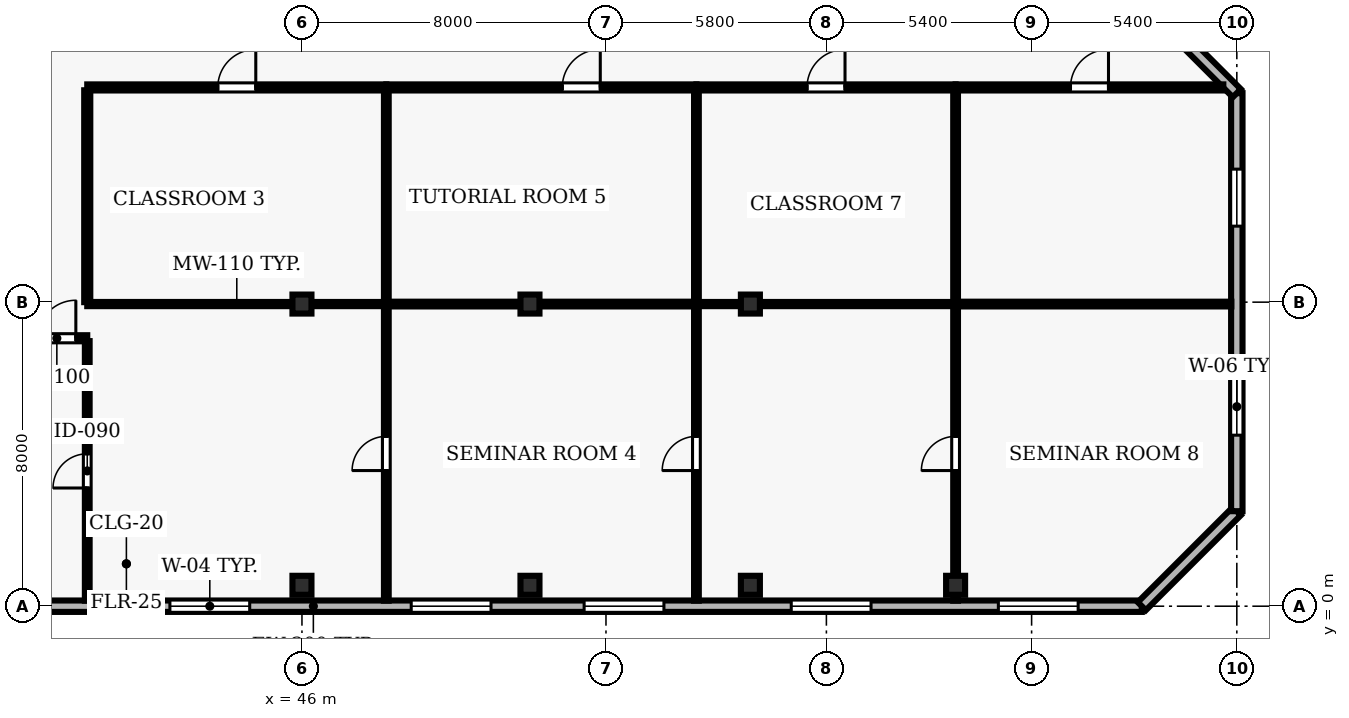
"""IFC4 building model, lengths in metres.
Left out: names, types, materials, properties, quantities, classifications, styles, units other than length and angle.
Written with IfcOpenShell. Run it as: python <this file> out.ifc"""

import sys

from ifc_helpers import new_model, si_unit, direction, frame, frame_2d, origin, origin_2d, place, context, subcontext, project, spatial, rectangle, hollow_rectangle, extrude, element, fill, save


model = new_model("IFC4")
c1 = context("Model", 3, precision=1e-05, world=origin(), true_north=direction((0.0, 1.0)))
c2 = subcontext(c1, "Body", "Model", "MODEL_VIEW")
j1 = project(units=[si_unit("LENGTHUNIT", "METRE"), si_unit("PLANEANGLEUNIT", "RADIAN")], contexts=[c1])
p1 = place(None, origin())
s1 = spatial("IfcSite", under=j1, at=p1, CompositionType="ELEMENT")
p2 = place(p1, origin())
s2 = spatial("IfcBuilding", under=s1, at=p2, CompositionType="ELEMENT")
p3 = place(p2, frame((0.0, 0.0, 161.9)))
s3 = spatial("IfcBuildingStorey", under=s2, at=p3, CompositionType="ELEMENT", Elevation=161.9)
for number, where, z_axis, x_axis in (
    (1, (46.0, 0.55, 0.0), (0.0, 0.0, 1.0), (1.0, 0.0, 0.0)),
    (2, (46.0, 7.95, 0.0), (0.0, 0.0, 1.0), (1.0, 0.0, 0.0)),
    (3, (52.0, 0.55, 0.0), (0.0, 0.0, 1.0), (1.0, 0.0, 0.0)),
    (4, (52.0, 7.95, 0.0), (0.0, 0.0, 1.0), (1.0, 0.0, 0.0)),
    (5, (57.8, 0.55, 0.0), (0.0, 0.0, 1.0), (1.0, 0.0, 0.0)),
    (6, (57.8, 7.95, 0.0), (0.0, 0.0, 1.0), (1.0, 0.0, 0.0)),
    (7, (63.2, 0.55, 0.0), (0.0, 0.0, 1.0), (1.0, 0.0, 0.0)),
):
    element("IfcColumn", number, at=place(p3, frame(where, z_axis=z_axis, x_axis=x_axis)), inside=s3, PredefinedType="COLUMN", context=c2, shape_type="SweptSolid", body=[
        extrude(hollow_rectangle(XDim=0.5, YDim=0.5, WallThickness=0.025, at=origin_2d()), origin(), (0.0, 0.0, 1.0), 3.9),
    ])
p4 = place(p3, frame((24.5, 0.0, 0.0), z_axis=(0.0, 0.0, 1.0), x_axis=(1.0, 0.0, 0.0)))
e8 = element("IfcWall", 8, at=p4, inside=s3, PredefinedType="SOLIDWALL", context=c2, shape_type="SweptSolid", body=[
    extrude(rectangle(XDim=43.6, YDim=0.3, at=frame_2d((21.8, 0.0))), origin(), (0.0, 0.0, 1.0), 3.64),
])
p5 = place(p4, frame((1.675, 0.0, 0.9)))
e9 = element("IfcOpeningElement", 9, at=p5, cuts=e8, PredefinedType="OPENING", context=c2, shape_type="SweptSolid", body=[
    extrude(rectangle(XDim=2.1, YDim=1.6, at=frame_2d((1.05, 0.8))), frame((0.0, 0.16, 0.0), z_axis=(0.0, -1.0, 0.0), x_axis=(1.0, 0.0, 0.0)), (0.0, 0.0, 1.0), 0.32),
])
p6 = place(p4, frame((18.025, 0.0, 0.9)))
e10 = element("IfcOpeningElement", 10, at=p6, cuts=e8, PredefinedType="OPENING", context=c2, shape_type="SweptSolid", body=[
    extrude(rectangle(XDim=2.1, YDim=1.6, at=frame_2d((1.05, 0.8))), frame((0.0, 0.16, 0.0), z_axis=(0.0, -1.0, 0.0), x_axis=(1.0, 0.0, 0.0)), (0.0, 0.0, 1.0), 0.32),
])
p7 = place(p4, frame((24.375, 0.0, 0.9)))
e11 = element("IfcOpeningElement", 11, at=p7, cuts=e8, PredefinedType="OPENING", context=c2, shape_type="SweptSolid", body=[
    extrude(rectangle(XDim=2.1, YDim=1.6, at=frame_2d((1.05, 0.8))), frame((0.0, 0.16, 0.0), z_axis=(0.0, -1.0, 0.0), x_axis=(1.0, 0.0, 0.0)), (0.0, 0.0, 1.0), 0.32),
])
p8 = place(p4, frame((28.925, 0.0, 0.9)))
e12 = element("IfcOpeningElement", 12, at=p8, cuts=e8, PredefinedType="OPENING", context=c2, shape_type="SweptSolid", body=[
    extrude(rectangle(XDim=2.1, YDim=1.6, at=frame_2d((1.05, 0.8))), frame((0.0, 0.16, 0.0), z_axis=(0.0, -1.0, 0.0), x_axis=(1.0, 0.0, 0.0)), (0.0, 0.0, 1.0), 0.32),
])
p9 = place(p4, frame((34.375, 0.0, 0.9)))
e13 = element("IfcOpeningElement", 13, at=p9, cuts=e8, PredefinedType="OPENING", context=c2, shape_type="SweptSolid", body=[
    extrude(rectangle(XDim=2.1, YDim=1.6, at=frame_2d((1.05, 0.8))), frame((0.0, 0.16, 0.0), z_axis=(0.0, -1.0, 0.0), x_axis=(1.0, 0.0, 0.0)), (0.0, 0.0, 1.0), 0.32),
])
p10 = place(p4, frame((39.825, 0.0, 0.9)))
e14 = element("IfcOpeningElement", 14, at=p10, cuts=e8, PredefinedType="OPENING", context=c2, shape_type="SweptSolid", body=[
    extrude(rectangle(XDim=2.1, YDim=1.6, at=frame_2d((1.05, 0.8))), frame((0.0, 0.16, 0.0), z_axis=(0.0, -1.0, 0.0), x_axis=(1.0, 0.0, 0.0)), (0.0, 0.0, 1.0), 0.32),
])
p11 = place(p3, frame((68.1, 0.0, 0.0), z_axis=(0.0, 0.0, 1.0), x_axis=(0.707106781187, 0.707106781187, 0.0)))
e15 = element("IfcWall", 15, at=p11, inside=s3, PredefinedType="SOLIDWALL", context=c2, shape_type="SweptSolid", body=[
    extrude(rectangle(XDim=3.536, YDim=0.3, at=frame_2d((1.768, 0.0))), origin(), (0.0, 0.0, 1.0), 3.64),
])
p12 = place(p3, frame((70.6, 2.5, 0.0), z_axis=(0.0, 0.0, 1.0), x_axis=(0.0, 1.0, 0.0)))
e16 = element("IfcWall", 16, at=p12, inside=s3, PredefinedType="SOLIDWALL", context=c2, shape_type="SweptSolid", body=[
    extrude(rectangle(XDim=11.0, YDim=0.3, at=frame_2d((5.5, 0.0))), origin(), (0.0, 0.0, 1.0), 3.64),
])
p13 = place(p12, frame((2.0, 0.0, 0.9)))
e17 = element("IfcOpeningElement", 17, at=p13, cuts=e16, PredefinedType="OPENING", context=c2, shape_type="SweptSolid", body=[
    extrude(rectangle(XDim=1.5, YDim=1.8, at=frame_2d((0.75, 0.9))), frame((0.0, 0.16, 0.0), z_axis=(0.0, -1.0, 0.0), x_axis=(1.0, 0.0, 0.0)), (0.0, 0.0, 1.0), 0.32),
])
p14 = place(p12, frame((7.5, 0.0, 0.9)))
e18 = element("IfcOpeningElement", 18, at=p14, cuts=e16, PredefinedType="OPENING", context=c2, shape_type="SweptSolid", body=[
    extrude(rectangle(XDim=1.5, YDim=1.8, at=frame_2d((0.75, 0.9))), frame((0.0, 0.16, 0.0), z_axis=(0.0, -1.0, 0.0), x_axis=(1.0, 0.0, 0.0)), (0.0, 0.0, 1.0), 0.32),
])
p15 = place(p3, frame((70.6, 13.5, 0.0), z_axis=(0.0, 0.0, 1.0), x_axis=(-0.707106781187, 0.707106781187, 0.0)))
e19 = element("IfcWall", 19, at=p15, inside=s3, PredefinedType="SOLIDWALL", context=c2, shape_type="SweptSolid", body=[
    extrude(rectangle(XDim=3.536, YDim=0.3, at=frame_2d((1.768, 0.0))), origin(), (0.0, 0.0, 1.0), 3.64),
])
p16 = place(p3, frame((38.05, 7.05, 0.0), z_axis=(0.0, 0.0, 1.0), x_axis=(1.0, 0.0, 0.0)))
e20 = element("IfcWall", 20, at=p16, inside=s3, PredefinedType="PARTITIONING", context=c2, shape_type="SweptSolid", body=[
    extrude(rectangle(XDim=2.3, YDim=0.16, at=frame_2d((1.15, 0.0))), origin(), (0.0, 0.0, 1.0), 3.64),
])
p17 = place(p16, frame((1.0, 0.0, 0.0)))
e21 = element("IfcOpeningElement", 21, at=p17, cuts=e20, PredefinedType="OPENING", context=c2, shape_type="SweptSolid", body=[
    extrude(rectangle(XDim=1.0, YDim=2.1, at=frame_2d((0.5, 1.05))), frame((0.0, 0.09, 0.0), z_axis=(0.0, -1.0, 0.0), x_axis=(1.0, 0.0, 0.0)), (0.0, 0.0, 1.0), 0.18),
])
p18 = place(p3, frame((40.35, 13.65, 0.0), z_axis=(0.0, 0.0, 1.0), x_axis=(1.0, 0.0, 0.0)))
e22 = element("IfcWall", 22, at=p18, inside=s3, PredefinedType="PARTITIONING", context=c2, shape_type="SweptSolid", body=[
    extrude(rectangle(XDim=7.87, YDim=0.16, at=frame_2d((3.935, 0.0))), origin(), (0.0, 0.0, 1.0), 3.64),
])
p19 = place(p18, frame((3.435, 0.0, 0.0)))
e23 = element("IfcOpeningElement", 23, at=p19, cuts=e22, PredefinedType="OPENING", context=c2, shape_type="SweptSolid", body=[
    extrude(rectangle(XDim=1.0, YDim=2.1, at=frame_2d((0.5, 1.05))), frame((0.0, 0.09, 0.0), z_axis=(0.0, -1.0, 0.0), x_axis=(1.0, 0.0, 0.0)), (0.0, 0.0, 1.0), 0.18),
])
p20 = place(p3, frame((48.22, 7.95, 0.0), z_axis=(0.0, 0.0, 1.0), x_axis=(-1.0, 0.0, 0.0)))
e24 = element("IfcWall", 24, at=p20, inside=s3, PredefinedType="MOVABLE", context=c2, shape_type="SweptSolid", body=[
    extrude(rectangle(XDim=7.87, YDim=0.11, at=frame_2d((3.935, 0.0))), origin(), (0.0, 0.0, 1.0), 3.023),
])
p21 = place(p3, frame((48.22, 13.65, 0.0), z_axis=(0.0, 0.0, 1.0), x_axis=(1.0, 0.0, 0.0)))
e25 = element("IfcWall", 25, at=p21, inside=s3, PredefinedType="PARTITIONING", context=c2, shape_type="SweptSolid", body=[
    extrude(rectangle(XDim=8.16, YDim=0.16, at=frame_2d((4.08, 0.0))), origin(), (0.0, 0.0, 1.0), 3.64),
])
p22 = place(p21, frame((4.63, 0.0, 0.0)))
e26 = element("IfcOpeningElement", 26, at=p22, cuts=e25, PredefinedType="OPENING", context=c2, shape_type="SweptSolid", body=[
    extrude(rectangle(XDim=1.0, YDim=2.1, at=frame_2d((0.5, 1.05))), frame((0.0, 0.09, 0.0), z_axis=(0.0, -1.0, 0.0), x_axis=(1.0, 0.0, 0.0)), (0.0, 0.0, 1.0), 0.18),
])
p23 = place(p3, frame((56.38, 7.95, 0.0), z_axis=(0.0, 0.0, 1.0), x_axis=(-1.0, 0.0, 0.0)))
e27 = element("IfcWall", 27, at=p23, inside=s3, PredefinedType="PARTITIONING", context=c2, shape_type="SweptSolid", body=[
    extrude(rectangle(XDim=8.16, YDim=0.125, at=frame_2d((4.08, 0.0))), origin(), (0.0, 0.0, 1.0), 3.023),
])
p24 = place(p3, frame((56.38, 13.65, 0.0), z_axis=(0.0, 0.0, 1.0), x_axis=(1.0, 0.0, 0.0)))
e28 = element("IfcWall", 28, at=p24, inside=s3, PredefinedType="PARTITIONING", context=c2, shape_type="SweptSolid", body=[
    extrude(rectangle(XDim=6.82, YDim=0.16, at=frame_2d((3.41, 0.0))), origin(), (0.0, 0.0, 1.0), 3.64),
])
p25 = place(p24, frame((2.91, 0.0, 0.0)))
e29 = element("IfcOpeningElement", 29, at=p25, cuts=e28, PredefinedType="OPENING", context=c2, shape_type="SweptSolid", body=[
    extrude(rectangle(XDim=1.0, YDim=2.1, at=frame_2d((0.5, 1.05))), frame((0.0, 0.09, 0.0), z_axis=(0.0, -1.0, 0.0), x_axis=(1.0, 0.0, 0.0)), (0.0, 0.0, 1.0), 0.18),
])
p26 = place(p3, frame((63.2, 7.95, 0.0), z_axis=(0.0, 0.0, 1.0), x_axis=(-1.0, 0.0, 0.0)))
e30 = element("IfcWall", 30, at=p26, inside=s3, PredefinedType="MOVABLE", context=c2, shape_type="SweptSolid", body=[
    extrude(rectangle(XDim=6.82, YDim=0.11, at=frame_2d((3.41, 0.0))), origin(), (0.0, 0.0, 1.0), 3.023),
])
p27 = place(p3, frame((63.2, 13.65, 0.0), z_axis=(0.0, 0.0, 1.0), x_axis=(1.0, 0.0, 0.0)))
e31 = element("IfcWall", 31, at=p27, inside=s3, PredefinedType="PARTITIONING", context=c2, shape_type="SweptSolid", body=[
    extrude(rectangle(XDim=7.045, YDim=0.16, at=frame_2d((3.522, 0.0))), origin(), (0.0, 0.0, 1.0), 3.64),
])
p28 = place(p27, frame((3.023, 0.0, 0.0)))
e32 = element("IfcOpeningElement", 32, at=p28, cuts=e31, PredefinedType="OPENING", context=c2, shape_type="SweptSolid", body=[
    extrude(rectangle(XDim=1.0, YDim=2.1, at=frame_2d((0.5, 1.05))), frame((0.0, 0.09, 0.0), z_axis=(0.0, -1.0, 0.0), x_axis=(1.0, 0.0, 0.0)), (0.0, 0.0, 1.0), 0.18),
])
p29 = place(p3, frame((70.455, 7.95, 0.0), z_axis=(0.0, 0.0, 1.0), x_axis=(-1.0, 0.0, 0.0)))
e33 = element("IfcWall", 33, at=p29, inside=s3, PredefinedType="PARTITIONING", context=c2, shape_type="SweptSolid", body=[
    extrude(rectangle(XDim=7.255, YDim=0.125, at=frame_2d((3.627, 0.0))), origin(), (0.0, 0.0, 1.0), 3.64),
])
p30 = place(p3, frame((40.35, 0.145, 0.0), z_axis=(0.0, 0.0, 1.0), x_axis=(0.0, 1.0, 0.0)))
e34 = element("IfcWall", 34, at=p30, inside=s3, PredefinedType="PARTITIONING", context=c2, shape_type="SweptSolid", body=[
    extrude(rectangle(XDim=6.83, YDim=0.125, at=frame_2d((3.415, 0.0))), origin(), (0.0, 0.0, 1.0), 3.64),
])
p31 = place(p30, frame((2.965, 0.0, 0.0)))
e35 = element("IfcOpeningElement", 35, at=p31, cuts=e34, PredefinedType="OPENING", context=c2, shape_type="SweptSolid", body=[
    extrude(rectangle(XDim=0.9, YDim=2.1, at=frame_2d((0.45, 1.05))), frame((0.0, 0.073, 0.0), z_axis=(0.0, -1.0, 0.0), x_axis=(1.0, 0.0, 0.0)), (0.0, 0.0, 1.0), 0.145),
])
p32 = place(p3, frame((40.35, 8.0, 0.0), z_axis=(0.0, 0.0, 1.0), x_axis=(0.0, 1.0, 0.0)))
e36 = element("IfcWall", 36, at=p32, inside=s3, PredefinedType="PARTITIONING", context=c2, shape_type="SweptSolid", body=[
    extrude(rectangle(XDim=5.575, YDim=0.16, at=frame_2d((2.788, 0.0))), origin(), (0.0, 0.0, 1.0), 3.64),
])
p33 = place(p3, frame((48.22, 0.145, 0.0), z_axis=(0.0, 0.0, 1.0), x_axis=(0.0, 1.0, 0.0)))
e37 = element("IfcWall", 37, at=p33, inside=s3, PredefinedType="PARTITIONING", context=c2, shape_type="SweptSolid", body=[
    extrude(rectangle(XDim=7.748, YDim=0.125, at=frame_2d((3.874, 0.0))), origin(), (0.0, 0.0, 1.0), 3.64),
])
p34 = place(p33, frame((3.424, 0.0, 0.0)))
e38 = element("IfcOpeningElement", 38, at=p34, cuts=e37, PredefinedType="OPENING", context=c2, shape_type="SweptSolid", body=[
    extrude(rectangle(XDim=0.9, YDim=2.1, at=frame_2d((0.45, 1.05))), frame((0.0, 0.073, 0.0), z_axis=(0.0, -1.0, 0.0), x_axis=(1.0, 0.0, 0.0)), (0.0, 0.0, 1.0), 0.145),
])
p35 = place(p3, frame((48.22, 8.008, 0.0), z_axis=(0.0, 0.0, 1.0), x_axis=(0.0, 1.0, 0.0)))
e39 = element("IfcWall", 39, at=p35, inside=s3, PredefinedType="PARTITIONING", context=c2, shape_type="SweptSolid", body=[
    extrude(rectangle(XDim=5.567, YDim=0.125, at=frame_2d((2.783, 0.0))), origin(), (0.0, 0.0, 1.0), 3.64),
])
p36 = place(p3, frame((56.38, 0.145, 0.0), z_axis=(0.0, 0.0, 1.0), x_axis=(0.0, 1.0, 0.0)))
e40 = element("IfcWall", 40, at=p36, inside=s3, PredefinedType="PARTITIONING", context=c2, shape_type="SweptSolid", body=[
    extrude(rectangle(XDim=7.748, YDim=0.125, at=frame_2d((3.874, 0.0))), origin(), (0.0, 0.0, 1.0), 3.64),
])
p37 = place(p36, frame((3.424, 0.0, 0.0)))
e41 = element("IfcOpeningElement", 41, at=p37, cuts=e40, PredefinedType="OPENING", context=c2, shape_type="SweptSolid", body=[
    extrude(rectangle(XDim=0.9, YDim=2.1, at=frame_2d((0.45, 1.05))), frame((0.0, 0.073, 0.0), z_axis=(0.0, -1.0, 0.0), x_axis=(1.0, 0.0, 0.0)), (0.0, 0.0, 1.0), 0.145),
])
p38 = place(p3, frame((56.38, 8.008, 0.0), z_axis=(0.0, 0.0, 1.0), x_axis=(0.0, 1.0, 0.0)))
e42 = element("IfcWall", 42, at=p38, inside=s3, PredefinedType="PARTITIONING", context=c2, shape_type="SweptSolid", body=[
    extrude(rectangle(XDim=5.567, YDim=0.125, at=frame_2d((2.783, 0.0))), origin(), (0.0, 0.0, 1.0), 3.64),
])
p39 = place(p3, frame((63.2, 0.145, 0.0), z_axis=(0.0, 0.0, 1.0), x_axis=(0.0, 1.0, 0.0)))
e43 = element("IfcWall", 43, at=p39, inside=s3, PredefinedType="PARTITIONING", context=c2, shape_type="SweptSolid", body=[
    extrude(rectangle(XDim=7.748, YDim=0.125, at=frame_2d((3.874, 0.0))), origin(), (0.0, 0.0, 1.0), 3.023),
])
p40 = place(p39, frame((3.424, 0.0, 0.0)))
e44 = element("IfcOpeningElement", 44, at=p40, cuts=e43, PredefinedType="OPENING", context=c2, shape_type="SweptSolid", body=[
    extrude(rectangle(XDim=0.9, YDim=2.1, at=frame_2d((0.45, 1.05))), frame((0.0, 0.073, 0.0), z_axis=(0.0, -1.0, 0.0), x_axis=(1.0, 0.0, 0.0)), (0.0, 0.0, 1.0), 0.145),
])
p41 = place(p3, frame((63.2, 8.008, 0.0), z_axis=(0.0, 0.0, 1.0), x_axis=(0.0, 1.0, 0.0)))
e45 = element("IfcWall", 45, at=p41, inside=s3, PredefinedType="PARTITIONING", context=c2, shape_type="SweptSolid", body=[
    extrude(rectangle(XDim=5.567, YDim=0.125, at=frame_2d((2.783, 0.0))), origin(), (0.0, 0.0, 1.0), 3.023),
])
p42 = place(p6, origin())
e46 = element("IfcWindow", 46, at=p42, inside=s3, PartitioningType="SINGLE_PANEL", PredefinedType="WINDOW", context=c2, shape_type="SweptSolid", body=[
    extrude(rectangle(XDim=2.1, YDim=1.6, at=frame_2d((1.05, 0.8))), frame((0.0, 0.03, 0.0), z_axis=(0.0, -1.0, 0.0), x_axis=(1.0, 0.0, 0.0)), (0.0, 0.0, 1.0), 0.06),
])
fill(e10, e46)
p43 = place(p7, origin())
e47 = element("IfcWindow", 47, at=p43, inside=s3, PartitioningType="SINGLE_PANEL", PredefinedType="WINDOW", context=c2, shape_type="SweptSolid", body=[
    extrude(rectangle(XDim=2.1, YDim=1.6, at=frame_2d((1.05, 0.8))), frame((0.0, 0.03, 0.0), z_axis=(0.0, -1.0, 0.0), x_axis=(1.0, 0.0, 0.0)), (0.0, 0.0, 1.0), 0.06),
])
fill(e11, e47)
p44 = place(p8, origin())
e48 = element("IfcWindow", 48, at=p44, inside=s3, PartitioningType="SINGLE_PANEL", PredefinedType="WINDOW", context=c2, shape_type="SweptSolid", body=[
    extrude(rectangle(XDim=2.1, YDim=1.6, at=frame_2d((1.05, 0.8))), frame((0.0, 0.03, 0.0), z_axis=(0.0, -1.0, 0.0), x_axis=(1.0, 0.0, 0.0)), (0.0, 0.0, 1.0), 0.06),
])
fill(e12, e48)
p45 = place(p9, origin())
e49 = element("IfcWindow", 49, at=p45, inside=s3, PartitioningType="SINGLE_PANEL", PredefinedType="WINDOW", context=c2, shape_type="SweptSolid", body=[
    extrude(rectangle(XDim=2.1, YDim=1.6, at=frame_2d((1.05, 0.8))), frame((0.0, 0.03, 0.0), z_axis=(0.0, -1.0, 0.0), x_axis=(1.0, 0.0, 0.0)), (0.0, 0.0, 1.0), 0.06),
])
fill(e13, e49)
p46 = place(p10, origin())
e50 = element("IfcWindow", 50, at=p46, inside=s3, PartitioningType="SINGLE_PANEL", PredefinedType="WINDOW", context=c2, shape_type="SweptSolid", body=[
    extrude(rectangle(XDim=2.1, YDim=1.6, at=frame_2d((1.05, 0.8))), frame((0.0, 0.03, 0.0), z_axis=(0.0, -1.0, 0.0), x_axis=(1.0, 0.0, 0.0)), (0.0, 0.0, 1.0), 0.06),
])
fill(e14, e50)
p47 = place(p13, origin())
e51 = element("IfcWindow", 51, at=p47, inside=s3, PartitioningType="SINGLE_PANEL", PredefinedType="WINDOW", context=c2, shape_type="SweptSolid", body=[
    extrude(rectangle(XDim=1.5, YDim=1.8, at=frame_2d((0.75, 0.9))), frame((0.0, 0.03, 0.0), z_axis=(0.0, -1.0, 0.0), x_axis=(1.0, 0.0, 0.0)), (0.0, 0.0, 1.0), 0.06),
])
fill(e17, e51)
p48 = place(p14, origin())
e52 = element("IfcWindow", 52, at=p48, inside=s3, PartitioningType="SINGLE_PANEL", PredefinedType="WINDOW", context=c2, shape_type="SweptSolid", body=[
    extrude(rectangle(XDim=1.5, YDim=1.8, at=frame_2d((0.75, 0.9))), frame((0.0, 0.03, 0.0), z_axis=(0.0, -1.0, 0.0), x_axis=(1.0, 0.0, 0.0)), (0.0, 0.0, 1.0), 0.06),
])
fill(e18, e52)
p49 = place(p17, origin())
e53 = element("IfcDoor", 53, at=p49, inside=s3, OperationType="SINGLE_SWING_RIGHT", PredefinedType="DOOR", context=c2, shape_type="SweptSolid", body=[
    extrude(rectangle(XDim=1.0, YDim=2.1, at=frame_2d((0.5, 1.05))), frame((0.0, 0.025, 0.0), z_axis=(0.0, -1.0, 0.0), x_axis=(1.0, 0.0, 0.0)), (0.0, 0.0, 1.0), 0.05),
])
fill(e21, e53)
p50 = place(p31, origin())
e54 = element("IfcDoor", 54, at=p50, inside=s3, OperationType="SINGLE_SWING_LEFT", PredefinedType="DOOR", context=c2, shape_type="SweptSolid", body=[
    extrude(rectangle(XDim=0.9, YDim=2.1, at=frame_2d((0.45, 1.05))), frame((0.0, 0.025, 0.0), z_axis=(0.0, -1.0, 0.0), x_axis=(1.0, 0.0, 0.0)), (0.0, 0.0, 1.0), 0.05),
])
fill(e35, e54)
p51 = place(p19, origin())
e55 = element("IfcDoor", 55, at=p51, inside=s3, OperationType="SINGLE_SWING_RIGHT", PredefinedType="DOOR", context=c2, shape_type="SweptSolid", body=[
    extrude(rectangle(XDim=1.0, YDim=2.1, at=frame_2d((0.5, 1.05))), frame((0.0, 0.025, 0.0), z_axis=(0.0, -1.0, 0.0), x_axis=(1.0, 0.0, 0.0)), (0.0, 0.0, 1.0), 0.05),
])
fill(e23, e55)
p52 = place(p34, origin())
e56 = element("IfcDoor", 56, at=p52, inside=s3, OperationType="SINGLE_SWING_LEFT", PredefinedType="DOOR", context=c2, shape_type="SweptSolid", body=[
    extrude(rectangle(XDim=0.9, YDim=2.1, at=frame_2d((0.45, 1.05))), frame((0.0, 0.025, 0.0), z_axis=(0.0, -1.0, 0.0), x_axis=(1.0, 0.0, 0.0)), (0.0, 0.0, 1.0), 0.05),
])
fill(e38, e56)
p53 = place(p22, origin())
e57 = element("IfcDoor", 57, at=p53, inside=s3, OperationType="SINGLE_SWING_RIGHT", PredefinedType="DOOR", context=c2, shape_type="SweptSolid", body=[
    extrude(rectangle(XDim=1.0, YDim=2.1, at=frame_2d((0.5, 1.05))), frame((0.0, 0.025, 0.0), z_axis=(0.0, -1.0, 0.0), x_axis=(1.0, 0.0, 0.0)), (0.0, 0.0, 1.0), 0.05),
])
fill(e26, e57)
p54 = place(p37, origin())
e58 = element("IfcDoor", 58, at=p54, inside=s3, OperationType="SINGLE_SWING_LEFT", PredefinedType="DOOR", context=c2, shape_type="SweptSolid", body=[
    extrude(rectangle(XDim=0.9, YDim=2.1, at=frame_2d((0.45, 1.05))), frame((0.0, 0.025, 0.0), z_axis=(0.0, -1.0, 0.0), x_axis=(1.0, 0.0, 0.0)), (0.0, 0.0, 1.0), 0.05),
])
fill(e41, e58)
p55 = place(p25, origin())
e59 = element("IfcDoor", 59, at=p55, inside=s3, OperationType="SINGLE_SWING_RIGHT", PredefinedType="DOOR", context=c2, shape_type="SweptSolid", body=[
    extrude(rectangle(XDim=1.0, YDim=2.1, at=frame_2d((0.5, 1.05))), frame((0.0, 0.025, 0.0), z_axis=(0.0, -1.0, 0.0), x_axis=(1.0, 0.0, 0.0)), (0.0, 0.0, 1.0), 0.05),
])
fill(e29, e59)
p56 = place(p40, origin())
e60 = element("IfcDoor", 60, at=p56, inside=s3, OperationType="SINGLE_SWING_LEFT", PredefinedType="DOOR", context=c2, shape_type="SweptSolid", body=[
    extrude(rectangle(XDim=0.9, YDim=2.1, at=frame_2d((0.45, 1.05))), frame((0.0, 0.025, 0.0), z_axis=(0.0, -1.0, 0.0), x_axis=(1.0, 0.0, 0.0)), (0.0, 0.0, 1.0), 0.05),
])
fill(e44, e60)
p57 = place(p28, origin())
e61 = element("IfcDoor", 61, at=p57, inside=s3, OperationType="SINGLE_SWING_RIGHT", PredefinedType="DOOR", context=c2, shape_type="SweptSolid", body=[
    extrude(rectangle(XDim=1.0, YDim=2.1, at=frame_2d((0.5, 1.05))), frame((0.0, 0.025, 0.0), z_axis=(0.0, -1.0, 0.0), x_axis=(1.0, 0.0, 0.0)), (0.0, 0.0, 1.0), 0.05),
])
fill(e32, e61)
save(model, sys.argv[1])
